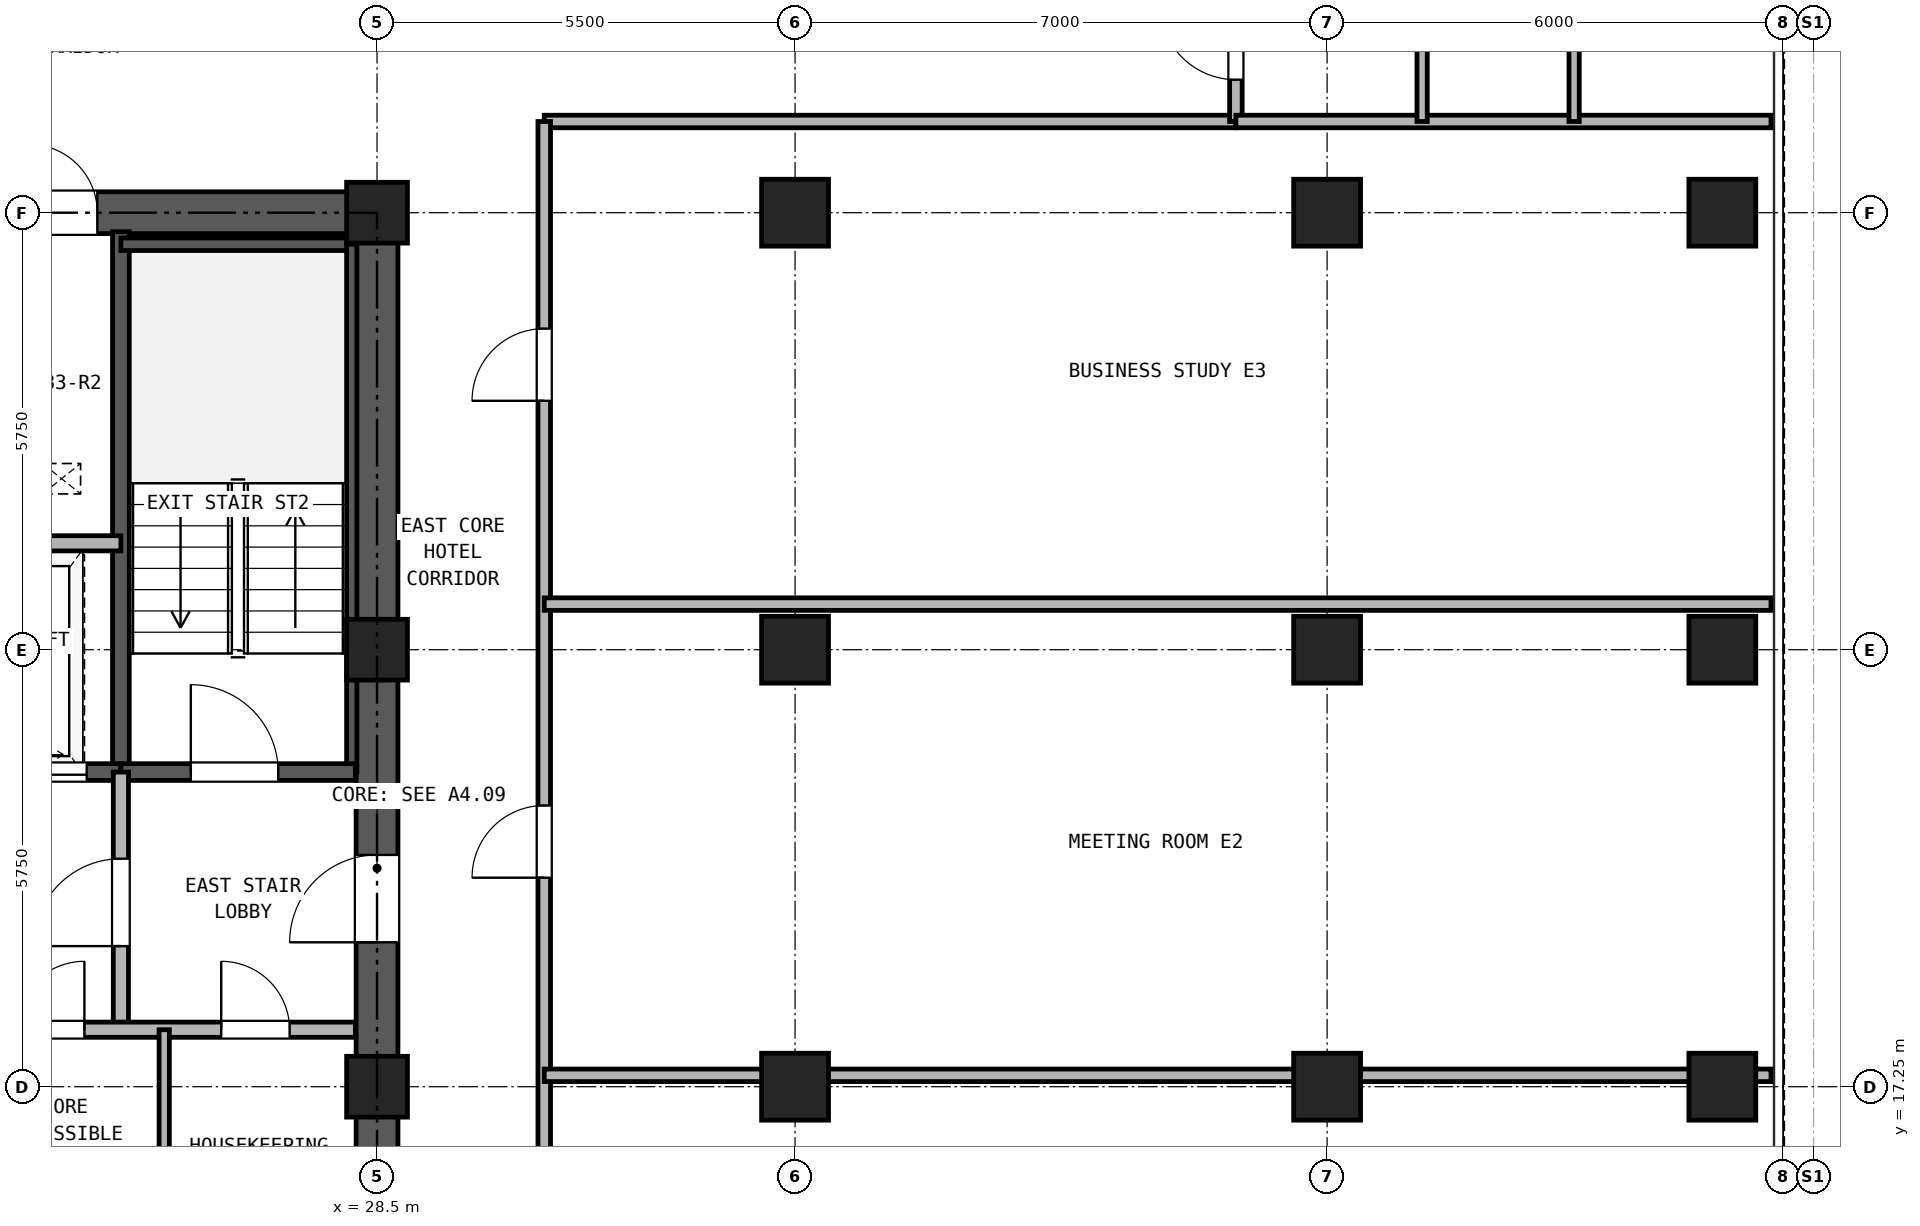
"""IFC4 building model, lengths in metres.
Left out: names, types, materials, properties, quantities, classifications, styles, units other than length and angle.
Written with IfcOpenShell. Run it as: python <this file> out.ifc"""

import sys

from ifc_helpers import new_model, si_unit, direction, frame, frame_2d, origin, origin_2d, place, context, subcontext, project, spatial, rectangle, hollow_rectangle, extrude, source, transform, mapped, element, fill, save


model = new_model("IFC4")
c1 = context("Model", 3, precision=1e-05, world=origin(), true_north=direction((0.0, 1.0)))
c2 = subcontext(c1, "Body", "Model", "MODEL_VIEW")
j1 = project(units=[si_unit("LENGTHUNIT", "METRE"), si_unit("PLANEANGLEUNIT", "RADIAN")], contexts=[c1])
p1 = place(None, origin())
s1 = spatial("IfcSite", under=j1, at=p1, CompositionType="ELEMENT")
p2 = place(p1, origin())
s2 = spatial("IfcBuilding", under=s1, at=p2, CompositionType="ELEMENT")
p3 = place(p2, frame((0.0, 0.0, 121.5)))
s3 = spatial("IfcBuildingStorey", under=s2, at=p3, CompositionType="ELEMENT", Elevation=121.5)
m1 = source(origin(), c2, "Body", "SweptSolid", [
    extrude(hollow_rectangle(XDim=0.88, YDim=0.88, WallThickness=0.05, at=origin_2d()), origin(), (0.0, 0.0, 1.0), 2.95),
])
for number, where, z_axis, x_axis in (
    (1, (46.2, 17.25, 0.0), (0.0, 0.0, 1.0), (1.0, 0.0, 0.0)),
    (2, (46.2, 23.0, 0.0), (0.0, 0.0, 1.0), (1.0, 0.0, 0.0)),
    (3, (46.2, 28.75, 0.0), (0.0, 0.0, 1.0), (1.0, 0.0, 0.0)),
):
    element("IfcColumn", number, at=place(p3, frame(where, z_axis=z_axis, x_axis=x_axis)), inside=s3, PredefinedType="COLUMN", context=c2, shape_type="MappedRepresentation", body=[
        mapped(m1, transform((0.0, 0.0, 0.0), x_axis=(1.0, 0.0, 0.0), y_axis=(0.0, 1.0, 0.0), z_axis=(0.0, 0.0, 1.0), scale=1.0)),
    ])
m2 = source(origin(), c2, "Body", "SweptSolid", [
    extrude(hollow_rectangle(XDim=0.8, YDim=0.8, WallThickness=0.045, at=origin_2d()), origin(), (0.0, 0.0, 1.0), 2.95),
])
for number, where, z_axis, x_axis in (
    (4, (28.5, 17.25, 0.0), (0.0, 0.0, 1.0), (1.0, 0.0, 0.0)),
    (5, (28.5, 23.0, 0.0), (0.0, 0.0, 1.0), (1.0, 0.0, 0.0)),
    (6, (28.5, 28.75, 0.0), (0.0, 0.0, 1.0), (1.0, 0.0, 0.0)),
):
    element("IfcColumn", number, at=place(p3, frame(where, z_axis=z_axis, x_axis=x_axis)), inside=s3, PredefinedType="COLUMN", context=c2, shape_type="MappedRepresentation", body=[
        mapped(m2, transform((0.0, 0.0, 0.0), x_axis=(1.0, 0.0, 0.0), y_axis=(0.0, 1.0, 0.0), z_axis=(0.0, 0.0, 1.0), scale=1.0)),
    ])
for number, where, z_axis, x_axis in (
    (7, (34.0, 17.25, 0.0), (0.0, 0.0, 1.0), (1.0, 0.0, 0.0)),
    (8, (34.0, 23.0, 0.0), (0.0, 0.0, 1.0), (1.0, 0.0, 0.0)),
    (9, (34.0, 28.75, 0.0), (0.0, 0.0, 1.0), (1.0, 0.0, 0.0)),
    (10, (41.0, 17.25, 0.0), (0.0, 0.0, 1.0), (1.0, 0.0, 0.0)),
    (11, (41.0, 23.0, 0.0), (0.0, 0.0, 1.0), (1.0, 0.0, 0.0)),
    (12, (41.0, 28.75, 0.0), (0.0, 0.0, 1.0), (1.0, 0.0, 0.0)),
):
    element("IfcColumn", number, at=place(p3, frame(where, z_axis=z_axis, x_axis=x_axis)), inside=s3, PredefinedType="COLUMN", context=c2, shape_type="MappedRepresentation", body=[
        mapped(m1, transform((0.0, 0.0, 0.0), x_axis=(1.0, 0.0, 0.0), y_axis=(0.0, 1.0, 0.0), z_axis=(0.0, 0.0, 1.0), scale=1.0)),
    ])
p4 = place(p3, frame((18.225, 28.75, 0.0), z_axis=(0.0, 0.0, 1.0), x_axis=(1.0, 0.0, 0.0)))
e13 = element("IfcWall", 13, at=p4, inside=s3, PredefinedType="SHEAR", context=c2, shape_type="SweptSolid", body=[
    extrude(rectangle(XDim=10.55, YDim=0.55, at=frame_2d((5.275, 0.0))), origin(), (0.0, 0.0, 1.0), 2.95),
])
p5 = place(p4, frame((4.155, 0.0, 0.0)))
e14 = element("IfcOpeningElement", 14, at=p5, cuts=e13, PredefinedType="OPENING", context=c2, shape_type="SweptSolid", body=[
    extrude(rectangle(XDim=0.9, YDim=2.05, at=frame_2d((0.45, 1.025))), frame((0.0, 0.285, 0.0), z_axis=(0.0, -1.0, 0.0), x_axis=(1.0, 0.0, 0.0)), (0.0, 0.0, 1.0), 0.57),
])
p6 = place(p4, frame((5.695, 0.0, 0.0)))
e15 = element("IfcOpeningElement", 15, at=p6, cuts=e13, PredefinedType="OPENING", context=c2, shape_type="SweptSolid", body=[
    extrude(rectangle(XDim=0.9, YDim=2.05, at=frame_2d((0.45, 1.025))), frame((0.0, 0.285, 0.0), z_axis=(0.0, -1.0, 0.0), x_axis=(1.0, 0.0, 0.0)), (0.0, 0.0, 1.0), 0.57),
])
p7 = place(p3, frame((28.5, 11.775, 0.0), z_axis=(0.0, 0.0, 1.0), x_axis=(0.0, 1.0, 0.0)))
e16 = element("IfcWall", 16, at=p7, inside=s3, PredefinedType="SHEAR", context=c2, shape_type="SweptSolid", body=[
    extrude(rectangle(XDim=16.7, YDim=0.55, at=frame_2d((8.35, 0.0))), origin(), (0.0, 0.0, 1.0), 2.95),
])
p8 = place(p7, frame((7.375, 0.0, 0.0)))
e17 = element("IfcOpeningElement", 17, at=p8, cuts=e16, PredefinedType="OPENING", context=c2, shape_type="SweptSolid", body=[
    extrude(rectangle(XDim=1.15, YDim=2.2, at=frame_2d((0.575, 1.1))), frame((0.0, 0.285, 0.0), z_axis=(0.0, -1.0, 0.0), x_axis=(1.0, 0.0, 0.0)), (0.0, 0.0, 1.0), 0.57),
])
p9 = place(p3, frame((25.13, 21.39, 0.0), z_axis=(0.0, 0.0, 1.0), x_axis=(0.0, 1.0, 0.0)))
e18 = element("IfcWall", 18, at=p9, inside=s3, PredefinedType="SOLIDWALL", context=c2, shape_type="SweptSolid", body=[
    extrude(rectangle(XDim=7.11, YDim=0.22, at=frame_2d((3.555, 0.0))), origin(), (0.0, 0.0, 1.0), 2.95),
])
p10 = place(p3, frame((25.13, 28.335, 0.0), z_axis=(0.0, 0.0, 1.0), x_axis=(1.0, 0.0, 0.0)))
e19 = element("IfcWall", 19, at=p10, inside=s3, PredefinedType="PARTITIONING", context=c2, shape_type="SweptSolid", body=[
    extrude(rectangle(XDim=3.085, YDim=0.165, at=frame_2d((1.542, 0.0))), origin(), (0.0, 0.0, 1.0), 2.95),
])
p11 = place(p3, frame((28.167, 21.39, 0.0), z_axis=(0.0, 0.0, 1.0), x_axis=(0.0, 1.0, 0.0)))
e20 = element("IfcWall", 20, at=p11, inside=s3, PredefinedType="PARTITIONING", context=c2, shape_type="SweptSolid", body=[
    extrude(rectangle(XDim=6.945, YDim=0.135, at=frame_2d((3.473, 0.0))), origin(), (0.0, 0.0, 1.0), 2.95),
])
p12 = place(p3, frame((18.785, 21.39, 0.0), z_axis=(0.0, 0.0, 1.0), x_axis=(1.0, 0.0, 0.0)))
e21 = element("IfcWall", 21, at=p12, inside=s3, PredefinedType="SOLIDWALL", context=c2, shape_type="SweptSolid", body=[
    extrude(rectangle(XDim=6.345, YDim=0.22, at=frame_2d((3.172, 0.0))), origin(), (0.0, 0.0, 1.0), 2.95),
])
p13 = place(p12, frame((1.065, 0.0, 0.0)))
e22 = element("IfcOpeningElement", 22, at=p13, cuts=e21, PredefinedType="OPENING", context=c2, shape_type="SweptSolid", body=[
    extrude(rectangle(XDim=1.15, YDim=2.2, at=frame_2d((0.575, 1.1))), frame((0.0, 0.12, 0.0), z_axis=(0.0, -1.0, 0.0), x_axis=(1.0, 0.0, 0.0)), (0.0, 0.0, 1.0), 0.24),
])
p14 = place(p12, frame((4.795, 0.0, 0.0)))
e23 = element("IfcOpeningElement", 23, at=p14, cuts=e21, PredefinedType="OPENING", context=c2, shape_type="SweptSolid", body=[
    extrude(rectangle(XDim=1.1, YDim=2.25, at=frame_2d((0.55, 1.125))), frame((0.0, 0.12, 0.0), z_axis=(0.0, -1.0, 0.0), x_axis=(1.0, 0.0, 0.0)), (0.0, 0.0, 1.0), 0.24),
])
p15 = place(p3, frame((25.13, 21.39, 0.0), z_axis=(0.0, 0.0, 1.0), x_axis=(1.0, 0.0, 0.0)))
e24 = element("IfcWall", 24, at=p15, inside=s3, PredefinedType="SOLIDWALL", context=c2, shape_type="SweptSolid", body=[
    extrude(rectangle(XDim=3.085, YDim=0.22, at=frame_2d((1.542, 0.0))), origin(), (0.0, 0.0, 1.0), 2.95),
])
p16 = place(p15, frame((0.92, 0.0, 0.0)))
e25 = element("IfcOpeningElement", 25, at=p16, cuts=e24, PredefinedType="OPENING", context=c2, shape_type="SweptSolid", body=[
    extrude(rectangle(XDim=1.15, YDim=2.2, at=frame_2d((0.575, 1.1))), frame((0.0, 0.12, 0.0), z_axis=(0.0, -1.0, 0.0), x_axis=(1.0, 0.0, 0.0)), (0.0, 0.0, 1.0), 0.24),
])
p17 = place(p3, frame((22.11, 24.4, 0.0), z_axis=(0.0, 0.0, 1.0), x_axis=(1.0, 0.0, 0.0)))
e26 = element("IfcWall", 26, at=p17, inside=s3, PredefinedType="PARTITIONING", context=c2, shape_type="SweptSolid", body=[
    extrude(rectangle(XDim=3.02, YDim=0.2, at=frame_2d((1.51, 0.0))), origin(), (0.0, 0.0, 1.0), 2.95),
])
p18 = place(p3, frame((25.13, 18.0, 0.0), z_axis=(0.0, 0.0, 1.0), x_axis=(0.0, 1.0, 0.0)))
e27 = element("IfcWall", 27, at=p18, inside=s3, PredefinedType="PARTITIONING", context=c2, shape_type="SweptSolid", body=[
    extrude(rectangle(XDim=3.39, YDim=0.2, at=frame_2d((1.695, 0.0))), origin(), (0.0, 0.0, 1.0), 2.95),
])
p19 = place(p18, frame((1.1, 0.0, 0.0)))
e28 = element("IfcOpeningElement", 28, at=p19, cuts=e27, PredefinedType="OPENING", context=c2, shape_type="SweptSolid", body=[
    extrude(rectangle(XDim=1.15, YDim=2.2, at=frame_2d((0.575, 1.1))), frame((0.0, 0.11, 0.0), z_axis=(0.0, -1.0, 0.0), x_axis=(1.0, 0.0, 0.0)), (0.0, 0.0, 1.0), 0.22),
])
p20 = place(p3, frame((18.785, 18.0, 0.0), z_axis=(0.0, 0.0, 1.0), x_axis=(1.0, 0.0, 0.0)))
e29 = element("IfcWall", 29, at=p20, inside=s3, PredefinedType="PARTITIONING", context=c2, shape_type="SweptSolid", body=[
    extrude(rectangle(XDim=9.43, YDim=0.2, at=frame_2d((4.715, 0.0))), origin(), (0.0, 0.0, 1.0), 2.95),
])
p21 = place(p20, frame((0.465, 0.0, 0.0)))
e30 = element("IfcOpeningElement", 30, at=p21, cuts=e29, PredefinedType="OPENING", context=c2, shape_type="SweptSolid", body=[
    extrude(rectangle(XDim=1.3, YDim=2.3, at=frame_2d((0.65, 1.15))), frame((0.0, 0.11, 0.0), z_axis=(0.0, -1.0, 0.0), x_axis=(1.0, 0.0, 0.0)), (0.0, 0.0, 1.0), 0.22),
])
p22 = place(p20, frame((2.565, 0.0, 0.0)))
e31 = element("IfcOpeningElement", 31, at=p22, cuts=e29, PredefinedType="OPENING", context=c2, shape_type="SweptSolid", body=[
    extrude(rectangle(XDim=1.3, YDim=2.3, at=frame_2d((0.65, 1.15))), frame((0.0, 0.11, 0.0), z_axis=(0.0, -1.0, 0.0), x_axis=(1.0, 0.0, 0.0)), (0.0, 0.0, 1.0), 0.22),
])
p23 = place(p20, frame((4.965, 0.0, 0.0)))
e32 = element("IfcOpeningElement", 32, at=p23, cuts=e29, PredefinedType="OPENING", context=c2, shape_type="SweptSolid", body=[
    extrude(rectangle(XDim=0.9, YDim=2.05, at=frame_2d((0.45, 1.025))), frame((0.0, 0.11, 0.0), z_axis=(0.0, -1.0, 0.0), x_axis=(1.0, 0.0, 0.0)), (0.0, 0.0, 1.0), 0.22),
])
p24 = place(p20, frame((7.665, 0.0, 0.0)))
e33 = element("IfcOpeningElement", 33, at=p24, cuts=e29, PredefinedType="OPENING", context=c2, shape_type="SweptSolid", body=[
    extrude(rectangle(XDim=0.9, YDim=2.05, at=frame_2d((0.45, 1.025))), frame((0.0, 0.11, 0.0), z_axis=(0.0, -1.0, 0.0), x_axis=(1.0, 0.0, 0.0)), (0.0, 0.0, 1.0), 0.22),
])
p25 = place(p3, frame((25.7, 15.0, 0.0), z_axis=(0.0, 0.0, 1.0), x_axis=(0.0, 1.0, 0.0)))
e34 = element("IfcWall", 34, at=p25, inside=s3, PredefinedType="PARTITIONING", context=c2, shape_type="SweptSolid", body=[
    extrude(rectangle(XDim=3.0, YDim=0.135, at=frame_2d((1.5, 0.0))), origin(), (0.0, 0.0, 1.0), 2.95),
])
p26 = place(p3, frame((30.7, 29.95, 0.0), z_axis=(0.0, 0.0, 1.0), x_axis=(1.0, 0.0, 0.0)))
e35 = element("IfcWall", 35, at=p26, inside=s3, PredefinedType="PARTITIONING", context=c2, shape_type="SweptSolid", body=[
    extrude(rectangle(XDim=9.1, YDim=0.165, at=frame_2d((4.55, 0.0))), origin(), (0.0, 0.0, 1.0), 2.95),
])
p27 = place(p3, frame((30.7, 11.2, 0.0), z_axis=(0.0, 0.0, 1.0), x_axis=(0.0, 1.0, 0.0)))
e36 = element("IfcWall", 36, at=p27, inside=s3, PredefinedType="PARTITIONING", context=c2, shape_type="SweptSolid", body=[
    extrude(rectangle(XDim=18.75, YDim=0.165, at=frame_2d((9.375, 0.0))), origin(), (0.0, 0.0, 1.0), 2.95),
])
p28 = place(p27, frame((2.6, 0.0, 0.0)))
e37 = element("IfcOpeningElement", 37, at=p28, cuts=e36, PredefinedType="OPENING", context=c2, shape_type="SweptSolid", body=[
    extrude(rectangle(XDim=0.95, YDim=2.15, at=frame_2d((0.475, 1.075))), frame((0.0, 0.093, 0.0), z_axis=(0.0, -1.0, 0.0), x_axis=(1.0, 0.0, 0.0)), (0.0, 0.0, 1.0), 0.185),
])
p29 = place(p27, frame((8.8, 0.0, 0.0)))
e38 = element("IfcOpeningElement", 38, at=p29, cuts=e36, PredefinedType="OPENING", context=c2, shape_type="SweptSolid", body=[
    extrude(rectangle(XDim=0.95, YDim=2.15, at=frame_2d((0.475, 1.075))), frame((0.0, 0.093, 0.0), z_axis=(0.0, -1.0, 0.0), x_axis=(1.0, 0.0, 0.0)), (0.0, 0.0, 1.0), 0.185),
])
p30 = place(p27, frame((15.075, 0.0, 0.0)))
e39 = element("IfcOpeningElement", 39, at=p30, cuts=e36, PredefinedType="OPENING", context=c2, shape_type="SweptSolid", body=[
    extrude(rectangle(XDim=0.95, YDim=2.15, at=frame_2d((0.475, 1.075))), frame((0.0, 0.093, 0.0), z_axis=(0.0, -1.0, 0.0), x_axis=(1.0, 0.0, 0.0)), (0.0, 0.0, 1.0), 0.185),
])
p31 = place(p3, frame((39.8, 29.95, 0.0), z_axis=(0.0, 0.0, 1.0), x_axis=(0.0, 1.0, 0.0)))
e40 = element("IfcWall", 40, at=p31, inside=s3, PredefinedType="PARTITIONING", context=c2, shape_type="SweptSolid", body=[
    extrude(rectangle(XDim=5.19, YDim=0.165, at=frame_2d((2.595, 0.0))), origin(), (0.0, 0.0, 1.0), 2.95),
])
p32 = place(p31, frame((0.55, 0.0, 0.0)))
e41 = element("IfcOpeningElement", 41, at=p32, cuts=e40, PredefinedType="OPENING", context=c2, shape_type="SweptSolid", body=[
    extrude(rectangle(XDim=1.0, YDim=2.15, at=frame_2d((0.5, 1.075))), frame((0.0, 0.093, 0.0), z_axis=(0.0, -1.0, 0.0), x_axis=(1.0, 0.0, 0.0)), (0.0, 0.0, 1.0), 0.185),
])
p33 = place(p3, frame((39.8, 29.95, 0.0), z_axis=(0.0, 0.0, 1.0), x_axis=(1.0, 0.0, 0.0)))
e42 = element("IfcWall", 42, at=p33, inside=s3, PredefinedType="PARTITIONING", context=c2, shape_type="SweptSolid", body=[
    extrude(rectangle(XDim=7.04, YDim=0.165, at=frame_2d((3.52, 0.0))), origin(), (0.0, 0.0, 1.0), 2.95),
])
for number, where, z_axis, x_axis in (
    (43, (42.25, 29.95, 0.0), (0.0, 0.0, 1.0), (0.0, 1.0, 0.0)),
    (44, (44.25, 29.95, 0.0), (0.0, 0.0, 1.0), (0.0, 1.0, 0.0)),
):
    element("IfcWall", number, at=place(p3, frame(where, z_axis=z_axis, x_axis=x_axis)), inside=s3, PredefinedType="PARTITIONING", context=c2, shape_type="SweptSolid", body=[
        extrude(rectangle(XDim=2.1, YDim=0.135, at=frame_2d((1.05, 0.0))), origin(), (0.0, 0.0, 1.0), 2.95),
    ])
p34 = place(p3, frame((30.7, 17.4, 0.0), z_axis=(0.0, 0.0, 1.0), x_axis=(1.0, 0.0, 0.0)))
e45 = element("IfcWall", 45, at=p34, inside=s3, PredefinedType="PARTITIONING", context=c2, shape_type="SweptSolid", body=[
    extrude(rectangle(XDim=16.14, YDim=0.165, at=frame_2d((8.07, 0.0))), origin(), (0.0, 0.0, 1.0), 2.247),
])
p35 = place(p3, frame((30.7, 23.6, 0.0), z_axis=(0.0, 0.0, 1.0), x_axis=(1.0, 0.0, 0.0)))
e46 = element("IfcWall", 46, at=p35, inside=s3, PredefinedType="PARTITIONING", context=c2, shape_type="SweptSolid", body=[
    extrude(rectangle(XDim=16.14, YDim=0.165, at=frame_2d((8.07, 0.0))), origin(), (0.0, 0.0, 1.0), 2.95),
])
p36 = place(p16, frame((1.15, 0.0, 0.0), z_axis=(0.0, 0.0, 1.0), x_axis=(-1.0, 0.0, 0.0)))
e47 = element("IfcDoor", 47, at=p36, inside=s3, OperationType="SINGLE_SWING_LEFT", PredefinedType="DOOR", context=c2, shape_type="SweptSolid", body=[
    extrude(rectangle(XDim=1.15, YDim=2.2, at=frame_2d((0.575, 1.1))), frame((0.0, 0.025, 0.0), z_axis=(0.0, -1.0, 0.0), x_axis=(1.0, 0.0, 0.0)), (0.0, 0.0, 1.0), 0.05),
])
fill(e25, e47)
p37 = place(p14, frame((1.1, 0.0, 0.0), z_axis=(0.0, 0.0, 1.0), x_axis=(-1.0, 0.0, 0.0)))
e48 = element("IfcDoor", 48, at=p37, inside=s3, OperationType="DOUBLE_DOOR_SLIDING", PredefinedType="DOOR", context=c2, shape_type="SweptSolid", body=[
    extrude(rectangle(XDim=1.1, YDim=2.25, at=frame_2d((0.55, 1.125))), frame((0.0, 0.025, 0.0), z_axis=(0.0, -1.0, 0.0), x_axis=(1.0, 0.0, 0.0)), (0.0, 0.0, 1.0), 0.05),
])
fill(e23, e48)
p38 = place(p19, origin())
e49 = element("IfcDoor", 49, at=p38, inside=s3, OperationType="SINGLE_SWING_LEFT", PredefinedType="DOOR", context=c2, shape_type="SweptSolid", body=[
    extrude(rectangle(XDim=1.15, YDim=2.2, at=frame_2d((0.575, 1.1))), frame((0.0, 0.025, 0.0), z_axis=(0.0, -1.0, 0.0), x_axis=(1.0, 0.0, 0.0)), (0.0, 0.0, 1.0), 0.05),
])
fill(e28, e49)
p39 = place(p23, frame((0.9, 0.0, 0.0), z_axis=(0.0, 0.0, 1.0), x_axis=(-1.0, 0.0, 0.0)))
e50 = element("IfcDoor", 50, at=p39, inside=s3, OperationType="SINGLE_SWING_RIGHT", PredefinedType="DOOR", context=c2, shape_type="SweptSolid", body=[
    extrude(rectangle(XDim=0.9, YDim=2.05, at=frame_2d((0.45, 1.025))), frame((0.0, 0.025, 0.0), z_axis=(0.0, -1.0, 0.0), x_axis=(1.0, 0.0, 0.0)), (0.0, 0.0, 1.0), 0.05),
])
fill(e32, e50)
p40 = place(p24, frame((0.9, 0.0, 0.0), z_axis=(0.0, 0.0, 1.0), x_axis=(-1.0, 0.0, 0.0)))
e51 = element("IfcDoor", 51, at=p40, inside=s3, OperationType="SINGLE_SWING_LEFT", PredefinedType="DOOR", context=c2, shape_type="SweptSolid", body=[
    extrude(rectangle(XDim=0.9, YDim=2.05, at=frame_2d((0.45, 1.025))), frame((0.0, 0.025, 0.0), z_axis=(0.0, -1.0, 0.0), x_axis=(1.0, 0.0, 0.0)), (0.0, 0.0, 1.0), 0.05),
])
fill(e33, e51)
p41 = place(p8, origin())
e52 = element("IfcDoor", 52, at=p41, inside=s3, OperationType="SINGLE_SWING_LEFT", PredefinedType="DOOR", context=c2, shape_type="SweptSolid", body=[
    extrude(rectangle(XDim=1.15, YDim=2.2, at=frame_2d((0.575, 1.1))), frame((0.0, 0.025, 0.0), z_axis=(0.0, -1.0, 0.0), x_axis=(1.0, 0.0, 0.0)), (0.0, 0.0, 1.0), 0.05),
])
fill(e17, e52)
p42 = place(p6, origin())
e53 = element("IfcDoor", 53, at=p42, inside=s3, OperationType="SINGLE_SWING_LEFT", PredefinedType="DOOR", context=c2, shape_type="SweptSolid", body=[
    extrude(rectangle(XDim=0.9, YDim=2.05, at=frame_2d((0.45, 1.025))), frame((0.0, 0.025, 0.0), z_axis=(0.0, -1.0, 0.0), x_axis=(1.0, 0.0, 0.0)), (0.0, 0.0, 1.0), 0.05),
])
fill(e15, e53)
p43 = place(p32, frame((1.0, 0.0, 0.0), z_axis=(0.0, 0.0, 1.0), x_axis=(-1.0, 0.0, 0.0)))
e54 = element("IfcDoor", 54, at=p43, inside=s3, OperationType="SINGLE_SWING_RIGHT", PredefinedType="DOOR", context=c2, shape_type="SweptSolid", body=[
    extrude(rectangle(XDim=1.0, YDim=2.15, at=frame_2d((0.5, 1.075))), frame((0.0, 0.025, 0.0), z_axis=(0.0, -1.0, 0.0), x_axis=(1.0, 0.0, 0.0)), (0.0, 0.0, 1.0), 0.05),
])
fill(e41, e54)
p44 = place(p29, origin())
e55 = element("IfcDoor", 55, at=p44, inside=s3, OperationType="SINGLE_SWING_LEFT", PredefinedType="DOOR", context=c2, shape_type="SweptSolid", body=[
    extrude(rectangle(XDim=0.95, YDim=2.15, at=frame_2d((0.475, 1.075))), frame((0.0, 0.025, 0.0), z_axis=(0.0, -1.0, 0.0), x_axis=(1.0, 0.0, 0.0)), (0.0, 0.0, 1.0), 0.05),
])
fill(e38, e55)
p45 = place(p30, origin())
e56 = element("IfcDoor", 56, at=p45, inside=s3, OperationType="SINGLE_SWING_LEFT", PredefinedType="DOOR", context=c2, shape_type="SweptSolid", body=[
    extrude(rectangle(XDim=0.95, YDim=2.15, at=frame_2d((0.475, 1.075))), frame((0.0, 0.025, 0.0), z_axis=(0.0, -1.0, 0.0), x_axis=(1.0, 0.0, 0.0)), (0.0, 0.0, 1.0), 0.05),
])
fill(e39, e56)
save(model, sys.argv[1])
